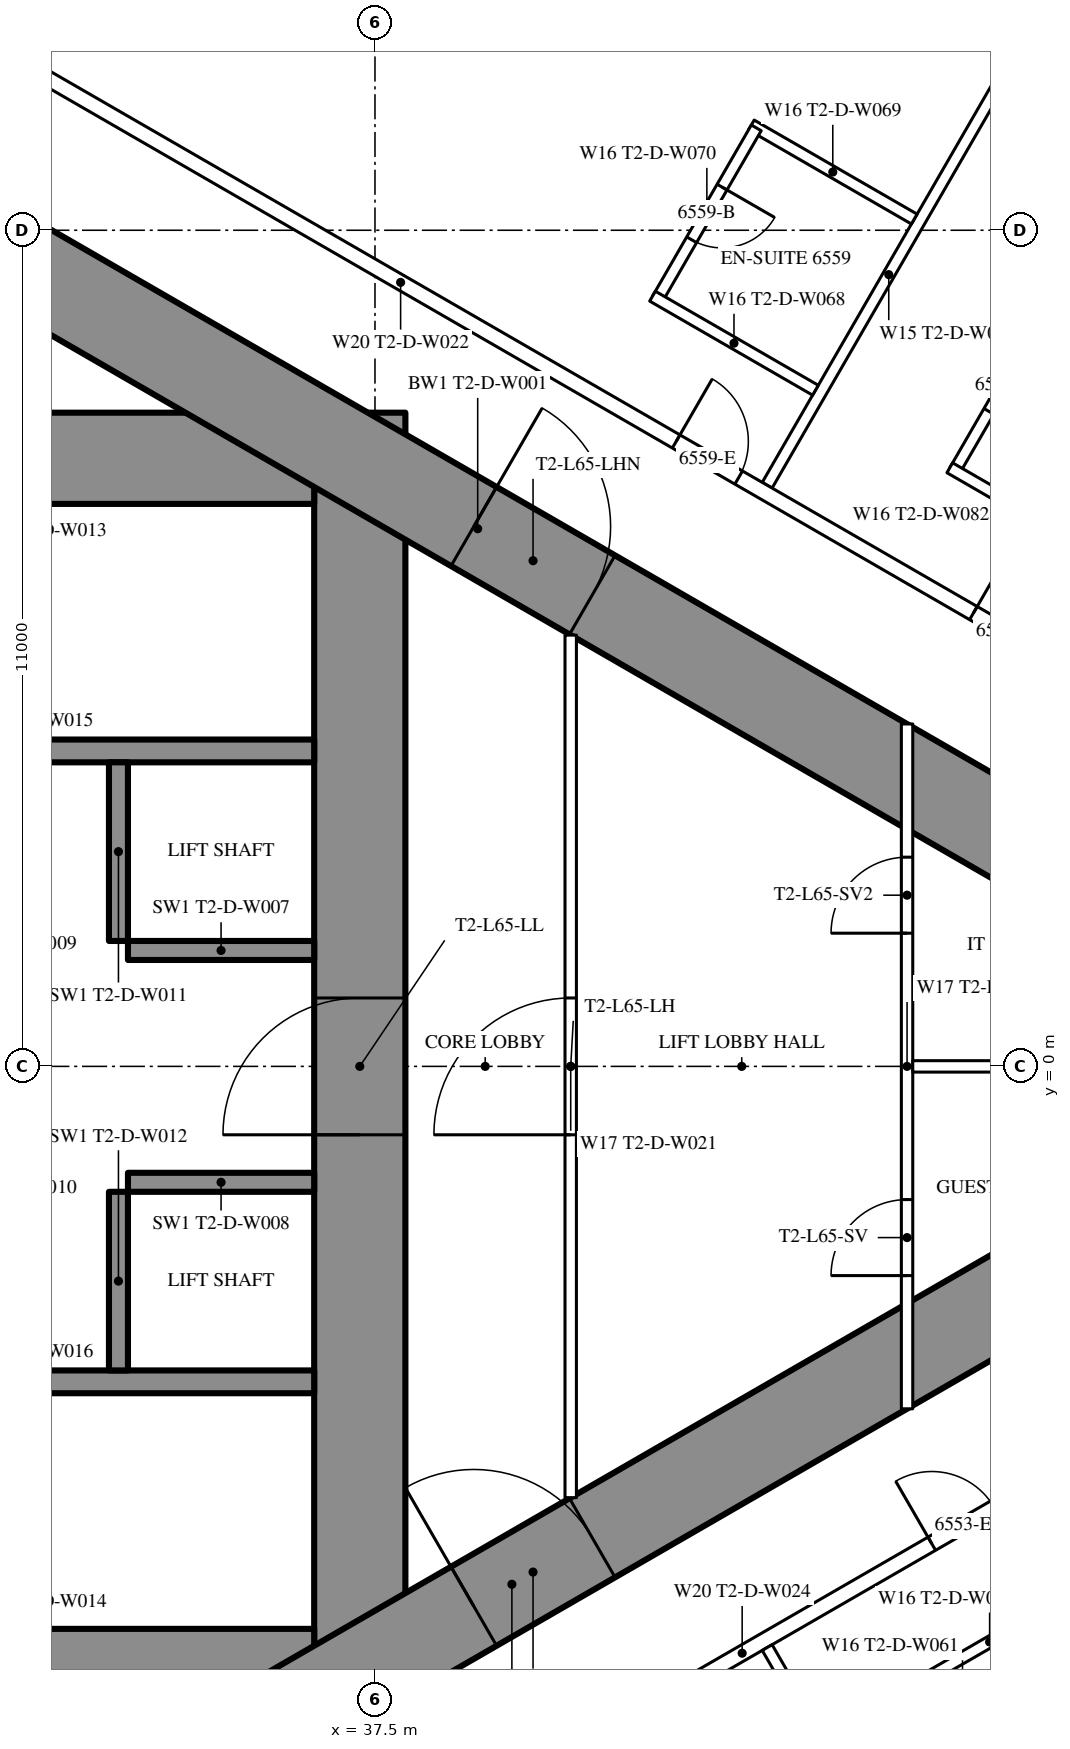
"""IFC4 building model, lengths in metres.
Left out: names, types, materials, properties, quantities, classifications, styles, units other than length and angle.
Written with IfcOpenShell. Run it as: python <this file> out.ifc"""

import sys

from ifc_helpers import new_model, si_unit, direction, frame, frame_2d, origin, origin_2d, place, context, subcontext, project, spatial, rectangle, circle, extrude, element, fill, save


model = new_model("IFC4")
c1 = context("Model", 3, precision=1e-05, world=origin(), true_north=direction((0.0, 1.0)))
c2 = subcontext(c1, "Body", "Model", "MODEL_VIEW")
j1 = project(units=[si_unit("LENGTHUNIT", "METRE"), si_unit("PLANEANGLEUNIT", "RADIAN")], contexts=[c1])
p1 = place(None, origin())
s1 = spatial("IfcSite", under=j1, at=p1, CompositionType="ELEMENT")
p2 = place(p1, origin())
s2 = spatial("IfcBuilding", under=s1, at=p2, CompositionType="ELEMENT")
p3 = place(p2, frame((0.0, 0.0, 244.1)))
s3 = spatial("IfcBuildingStorey", under=s2, at=p3, CompositionType="ELEMENT", Elevation=244.1)
p4 = place(p3, frame((46.499, 14.226, 0.0), z_axis=(0.0, 0.0, 1.0), x_axis=(1.0, 0.0, 0.0)))
e1 = element("IfcColumn", 1, at=p4, inside=s3, PredefinedType="COLUMN", context=c2, shape_type="SweptSolid", body=[
    extrude(circle(Radius=1.2, at=origin_2d()), origin(), (0.0, 0.0, 1.0), 3.6),
])
p5 = place(p3, frame((37.3, -8.6, 0.0), z_axis=(0.0, 0.0, 1.0), x_axis=(0.0, 1.0, 0.0)))
e2 = element("IfcWall", 2, at=p5, inside=s3, PredefinedType="SHEAR", context=c2, shape_type="SweptSolid", body=[
    extrude(rectangle(XDim=17.2, YDim=1.2, at=frame_2d((8.6, 0.0))), origin(), (0.0, 0.0, 1.0), 3.6),
])
p6 = place(p5, frame((7.7, 0.0, 0.0)))
e3 = element("IfcOpeningElement", 3, at=p6, cuts=e2, PredefinedType="OPENING", context=c2, shape_type="SweptSolid", body=[
    extrude(rectangle(XDim=1.8, YDim=2.2, at=frame_2d((0.9, 1.1))), frame((0.0, 0.61, 0.0), z_axis=(0.0, -1.0, 0.0), x_axis=(1.0, 0.0, 0.0)), (0.0, 0.0, 1.0), 1.22),
])
p7 = place(p3, frame((28.3, -8.0, 0.0), z_axis=(0.0, 0.0, 1.0), x_axis=(1.0, 0.0, 0.0)))
e4 = element("IfcWall", 4, at=p7, inside=s3, PredefinedType="SHEAR", context=c2, shape_type="SweptSolid", body=[
    extrude(rectangle(XDim=8.4, YDim=1.2, at=frame_2d((4.2, 0.0))), origin(), (0.0, 0.0, 1.0), 3.6),
])
p8 = place(p7, frame((0.25, 0.0, 0.0)))
e5 = element("IfcOpeningElement", 5, at=p8, cuts=e4, PredefinedType="OPENING", context=c2, shape_type="SweptSolid", body=[
    extrude(rectangle(XDim=1.0, YDim=2.2, at=frame_2d((0.5, 1.1))), frame((0.0, 0.61, 0.0), z_axis=(0.0, -1.0, 0.0), x_axis=(1.0, 0.0, 0.0)), (0.0, 0.0, 1.0), 1.22),
])
p9 = place(p3, frame((28.3, 8.0, 0.0), z_axis=(0.0, 0.0, 1.0), x_axis=(1.0, 0.0, 0.0)))
e6 = element("IfcWall", 6, at=p9, inside=s3, PredefinedType="SHEAR", context=c2, shape_type="SweptSolid", body=[
    extrude(rectangle(XDim=8.4, YDim=1.2, at=frame_2d((4.2, 0.0))), origin(), (0.0, 0.0, 1.0), 3.6),
])
p10 = place(p9, frame((0.25, 0.0, 0.0)))
e7 = element("IfcOpeningElement", 7, at=p10, cuts=e6, PredefinedType="OPENING", context=c2, shape_type="SweptSolid", body=[
    extrude(rectangle(XDim=1.0, YDim=2.2, at=frame_2d((0.5, 1.1))), frame((0.0, 0.61, 0.0), z_axis=(0.0, -1.0, 0.0), x_axis=(1.0, 0.0, 0.0)), (0.0, 0.0, 1.0), 1.22),
])
for number, where, z_axis, x_axis in (
    (8, (28.3, -4.15, 0.0), (0.0, 0.0, 1.0), (1.0, 0.0, 0.0)),
    (9, (28.3, 4.15, 0.0), (0.0, 0.0, 1.0), (1.0, 0.0, 0.0)),
):
    element("IfcWall", number, at=place(p3, frame(where, z_axis=z_axis, x_axis=x_axis)), inside=s3, PredefinedType="SHEAR", context=c2, shape_type="SweptSolid", body=[
        extrude(rectangle(XDim=8.4, YDim=0.3, at=frame_2d((4.2, 0.0))), origin(), (0.0, 0.0, 1.0), 3.6),
    ])
p11 = place(p3, frame((34.125, -4.0, 0.0), z_axis=(0.0, 0.0, 1.0), x_axis=(0.0, 1.0, 0.0)))
e10 = element("IfcWall", 10, at=p11, inside=s3, PredefinedType="SHEAR", context=c2, shape_type="SweptSolid", body=[
    extrude(rectangle(XDim=2.35, YDim=0.25, at=frame_2d((1.175, 0.0))), origin(), (0.0, 0.0, 1.0), 3.6),
])
p12 = place(p3, frame((34.25, -1.525, 0.0), z_axis=(0.0, 0.0, 1.0), x_axis=(1.0, 0.0, 0.0)))
e11 = element("IfcWall", 11, at=p12, inside=s3, PredefinedType="SHEAR", context=c2, shape_type="SweptSolid", body=[
    extrude(rectangle(XDim=2.45, YDim=0.25, at=frame_2d((1.225, 0.0))), origin(), (0.0, 0.0, 1.0), 3.6),
])
p13 = place(p3, frame((34.125, 1.65, 0.0), z_axis=(0.0, 0.0, 1.0), x_axis=(0.0, 1.0, 0.0)))
e12 = element("IfcWall", 12, at=p13, inside=s3, PredefinedType="SHEAR", context=c2, shape_type="SweptSolid", body=[
    extrude(rectangle(XDim=2.35, YDim=0.25, at=frame_2d((1.175, 0.0))), origin(), (0.0, 0.0, 1.0), 3.6),
])
p14 = place(p3, frame((34.25, 1.525, 0.0), z_axis=(0.0, 0.0, 1.0), x_axis=(1.0, 0.0, 0.0)))
e13 = element("IfcWall", 13, at=p14, inside=s3, PredefinedType="SHEAR", context=c2, shape_type="SweptSolid", body=[
    extrude(rectangle(XDim=2.45, YDim=0.25, at=frame_2d((1.225, 0.0))), origin(), (0.0, 0.0, 1.0), 3.6),
])
p15 = place(p3, frame((27.2, -13.8, 0.0), z_axis=(0.0, 0.0, 1.0), x_axis=(0.866027159892, 0.499996958321, 0.0)))
e14 = element("IfcWall", 14, at=p15, inside=s3, PredefinedType="SHEAR", context=c2, shape_type="SweptSolid", body=[
    extrude(rectangle(XDim=27.947, YDim=1.2, at=frame_2d((13.973, 0.0))), origin(), (0.0, 0.0, 1.0), 3.6),
])
p16 = place(p15, frame((4.6, 0.0, 0.0)))
e15 = element("IfcOpeningElement", 15, at=p16, cuts=e14, PredefinedType="OPENING", context=c2, shape_type="SweptSolid", body=[
    extrude(rectangle(XDim=1.0, YDim=2.2, at=frame_2d((0.5, 1.1))), frame((0.0, 0.61, 0.0), z_axis=(0.0, -1.0, 0.0), x_axis=(1.0, 0.0, 0.0)), (0.0, 0.0, 1.0), 1.22),
])
p17 = place(p15, frame((13.395, 0.0, 0.0)))
e16 = element("IfcOpeningElement", 16, at=p17, cuts=e14, PredefinedType="OPENING", context=c2, shape_type="SweptSolid", body=[
    extrude(rectangle(XDim=1.8, YDim=2.2, at=frame_2d((0.9, 1.1))), frame((0.0, 0.61, 0.0), z_axis=(0.0, -1.0, 0.0), x_axis=(1.0, 0.0, 0.0)), (0.0, 0.0, 1.0), 1.22),
])
p18 = place(p3, frame((27.2, 13.8, 0.0), z_axis=(0.0, 0.0, 1.0), x_axis=(0.866024515034, -0.500001539357, 0.0)))
e17 = element("IfcWall", 17, at=p18, inside=s3, PredefinedType="SHEAR", context=c2, shape_type="SweptSolid", body=[
    extrude(rectangle(XDim=26.907, YDim=1.2, at=frame_2d((13.454, 0.0))), origin(), (0.0, 0.0, 1.0), 3.6),
])
p19 = place(p18, frame((4.6, 0.0, 0.0)))
e18 = element("IfcOpeningElement", 18, at=p19, cuts=e17, PredefinedType="OPENING", context=c2, shape_type="SweptSolid", body=[
    extrude(rectangle(XDim=1.0, YDim=2.2, at=frame_2d((0.5, 1.1))), frame((0.0, 0.61, 0.0), z_axis=(0.0, -1.0, 0.0), x_axis=(1.0, 0.0, 0.0)), (0.0, 0.0, 1.0), 1.22),
])
p20 = place(p18, frame((13.395, 0.0, 0.0)))
e19 = element("IfcOpeningElement", 19, at=p20, cuts=e17, PredefinedType="OPENING", context=c2, shape_type="SweptSolid", body=[
    extrude(rectangle(XDim=1.8, YDim=2.2, at=frame_2d((0.9, 1.1))), frame((0.0, 0.61, 0.0), z_axis=(0.0, -1.0, 0.0), x_axis=(1.0, 0.0, 0.0)), (0.0, 0.0, 1.0), 1.22),
])
p21 = place(p3, frame((28.959, -15.44, 0.0), z_axis=(0.0, 0.0, 1.0), x_axis=(0.866025227435, 0.500000305447, 0.0)))
e20 = element("IfcWall", 20, at=p21, inside=s3, PredefinedType="PARTITIONING", context=c2, shape_type="SweptSolid", body=[
    extrude(rectangle(XDim=30.88, YDim=0.2, at=frame_2d((15.44, 0.0))), origin(), (0.0, 0.0, 1.0), 3.35),
])
p22 = place(p21, frame((1.494, 0.0, 0.0)))
e21 = element("IfcOpeningElement", 21, at=p22, cuts=e20, PredefinedType="OPENING", context=c2, shape_type="SweptSolid", body=[
    extrude(rectangle(XDim=1.8, YDim=2.04, at=frame_2d((0.9, 1.02))), frame((0.0, 0.11, 0.0), z_axis=(0.0, -1.0, 0.0), x_axis=(1.0, 0.0, 0.0)), (0.0, 0.0, 1.0), 0.22),
])
p23 = place(p21, frame((7.687, 0.0, 0.0)))
e22 = element("IfcOpeningElement", 22, at=p23, cuts=e20, PredefinedType="OPENING", context=c2, shape_type="SweptSolid", body=[
    extrude(rectangle(XDim=1.0, YDim=2.2, at=frame_2d((0.5, 1.1))), frame((0.0, 0.11, 0.0), z_axis=(0.0, -1.0, 0.0), x_axis=(1.0, 0.0, 0.0)), (0.0, 0.0, 1.0), 0.22),
])
p24 = place(p21, frame((18.321, 0.0, 0.0)))
e23 = element("IfcOpeningElement", 23, at=p24, cuts=e20, PredefinedType="OPENING", context=c2, shape_type="SweptSolid", body=[
    extrude(rectangle(XDim=0.95, YDim=2.2, at=frame_2d((0.475, 1.1))), frame((0.0, 0.11, 0.0), z_axis=(0.0, -1.0, 0.0), x_axis=(1.0, 0.0, 0.0)), (0.0, 0.0, 1.0), 0.22),
])
p25 = place(p21, frame((22.203, 0.0, 0.0)))
e24 = element("IfcOpeningElement", 24, at=p25, cuts=e20, PredefinedType="OPENING", context=c2, shape_type="SweptSolid", body=[
    extrude(rectangle(XDim=0.95, YDim=2.2, at=frame_2d((0.475, 1.1))), frame((0.0, 0.11, 0.0), z_axis=(0.0, -1.0, 0.0), x_axis=(1.0, 0.0, 0.0)), (0.0, 0.0, 1.0), 0.22),
])
p26 = place(p21, frame((26.192, 0.0, 0.0)))
e25 = element("IfcOpeningElement", 25, at=p26, cuts=e20, PredefinedType="OPENING", context=c2, shape_type="SweptSolid", body=[
    extrude(rectangle(XDim=1.8, YDim=2.2, at=frame_2d((0.9, 1.1))), frame((0.0, 0.11, 0.0), z_axis=(0.0, -1.0, 0.0), x_axis=(1.0, 0.0, 0.0)), (0.0, 0.0, 1.0), 0.22),
])
p27 = place(p3, frame((42.66, -7.646, 0.0), z_axis=(0.0, 0.0, 1.0), x_axis=(0.499996592859, -0.866027370889, 0.0)))
e26 = element("IfcWall", 26, at=p27, inside=s3, PredefinedType="PARTITIONING", context=c2, shape_type="SweptSolid", body=[
    extrude(rectangle(XDim=6.398, YDim=0.15, at=frame_2d((3.199, 0.0))), origin(), (0.0, 0.0, 1.0), 2.45),
])
p28 = place(p3, frame((32.96, 13.246, 0.0), z_axis=(0.0, 0.0, 1.0), x_axis=(0.500000236886, 0.866025267018, 0.0)))
e27 = element("IfcWall", 27, at=p28, inside=s3, PredefinedType="PARTITIONING", context=c2, shape_type="SweptSolid", body=[
    extrude(rectangle(XDim=7.583, YDim=0.15, at=frame_2d((3.791, 0.0))), origin(), (0.0, 0.0, 1.0), 3.35),
])
p29 = place(p3, frame((42.66, 7.646, 0.0), z_axis=(0.0, 0.0, 1.0), x_axis=(0.499996592859, 0.866027370889, 0.0)))
e28 = element("IfcWall", 28, at=p29, inside=s3, PredefinedType="PARTITIONING", context=c2, shape_type="SweptSolid", body=[
    extrude(rectangle(XDim=6.398, YDim=0.15, at=frame_2d((3.199, 0.0))), origin(), (0.0, 0.0, 1.0), 2.45),
])
p30 = place(p3, frame((28.959, 15.44, 0.0), z_axis=(0.0, 0.0, 1.0), x_axis=(0.866028936079, -0.499993881836, 0.0)))
e29 = element("IfcWall", 29, at=p30, inside=s3, PredefinedType="PARTITIONING", context=c2, shape_type="SweptSolid", body=[
    extrude(rectangle(XDim=20.503, YDim=0.2, at=frame_2d((10.251, 0.0))), origin(), (0.0, 0.0, 1.0), 3.35),
])
p31 = place(p30, frame((18.953, 0.0, 0.0)))
e30 = element("IfcOpeningElement", 30, at=p31, cuts=e29, PredefinedType="OPENING", context=c2, shape_type="SweptSolid", body=[
    extrude(rectangle(XDim=0.95, YDim=2.2, at=frame_2d((0.475, 1.1))), frame((0.0, 0.11, 0.0), z_axis=(0.0, -1.0, 0.0), x_axis=(1.0, 0.0, 0.0)), (0.0, 0.0, 1.0), 0.22),
])
p32 = place(p30, frame((14.437, 0.0, 0.0)))
e31 = element("IfcOpeningElement", 31, at=p32, cuts=e29, PredefinedType="OPENING", context=c2, shape_type="SweptSolid", body=[
    extrude(rectangle(XDim=0.95, YDim=2.2, at=frame_2d((0.475, 1.1))), frame((0.0, 0.11, 0.0), z_axis=(0.0, -1.0, 0.0), x_axis=(1.0, 0.0, 0.0)), (0.0, 0.0, 1.0), 0.22),
])
p33 = place(p30, frame((2.244, 0.0, 0.0)))
e32 = element("IfcOpeningElement", 32, at=p33, cuts=e29, PredefinedType="OPENING", context=c2, shape_type="SweptSolid", body=[
    extrude(rectangle(XDim=1.8, YDim=2.04, at=frame_2d((0.9, 1.02))), frame((0.0, 0.11, 0.0), z_axis=(0.0, -1.0, 0.0), x_axis=(1.0, 0.0, 0.0)), (0.0, 0.0, 1.0), 0.22),
])
p34 = place(p3, frame((44.514, -8.191, 0.0), z_axis=(0.0, 0.0, 1.0), x_axis=(0.866031185235, 0.4999899861, 0.0)))
e33 = element("IfcWall", 33, at=p34, inside=s3, PredefinedType="PARTITIONING", context=c2, shape_type="SweptSolid", body=[
    extrude(rectangle(XDim=2.475, YDim=0.15, at=frame_2d((1.238, 0.0))), origin(), (0.0, 0.0, 1.0), 3.35),
])
p35 = place(p3, frame((45.127, 7.838, 0.0), z_axis=(0.0, 0.0, 1.0), x_axis=(0.500006934395, 0.866021400173, 0.0)))
e34 = element("IfcWall", 34, at=p35, inside=s3, PredefinedType="PARTITIONING", context=c2, shape_type="SweptSolid", body=[
    extrude(rectangle(XDim=2.6, YDim=0.15, at=frame_2d((1.3, 0.0))), origin(), (0.0, 0.0, 1.0), 3.35),
])
p36 = place(p35, frame((0.9, 0.0, 0.0)))
e35 = element("IfcOpeningElement", 35, at=p36, cuts=e34, PredefinedType="OPENING", context=c2, shape_type="SweptSolid", body=[
    extrude(rectangle(XDim=0.8, YDim=2.2, at=frame_2d((0.4, 1.1))), frame((0.0, 0.085, 0.0), z_axis=(0.0, -1.0, 0.0), x_axis=(1.0, 0.0, 0.0)), (0.0, 0.0, 1.0), 0.17),
])
p37 = place(p3, frame((45.062, 7.875, 0.0), z_axis=(0.0, 0.0, 1.0), x_axis=(0.866031185235, -0.4999899861, 0.0)))
e36 = element("IfcWall", 36, at=p37, inside=s3, PredefinedType="PARTITIONING", context=c2, shape_type="SweptSolid", body=[
    extrude(rectangle(XDim=2.475, YDim=0.15, at=frame_2d((1.238, 0.0))), origin(), (0.0, 0.0, 1.0), 2.5),
])
p38 = place(p3, frame((42.451, 12.385, 0.0), z_axis=(0.0, 0.0, 1.0), x_axis=(0.866031185235, -0.4999899861, 0.0)))
e37 = element("IfcWall", 37, at=p38, inside=s3, PredefinedType="PARTITIONING", context=c2, shape_type="SweptSolid", body=[
    extrude(rectangle(XDim=2.475, YDim=0.15, at=frame_2d((1.238, 0.0))), origin(), (0.0, 0.0, 1.0), 3.35),
])
p39 = place(p3, frame((41.216, 10.095, 0.0), z_axis=(0.0, 0.0, 1.0), x_axis=(0.499936506574, 0.866062058628, 0.0)))
e38 = element("IfcWall", 38, at=p39, inside=s3, PredefinedType="PARTITIONING", context=c2, shape_type="SweptSolid", body=[
    extrude(rectangle(XDim=2.6, YDim=0.15, at=frame_2d((1.3, 0.0))), origin(), (0.0, 0.0, 1.0), 3.35),
])
p40 = place(p39, frame((0.9, 0.0, 0.0)))
e39 = element("IfcOpeningElement", 39, at=p40, cuts=e38, PredefinedType="OPENING", context=c2, shape_type="SweptSolid", body=[
    extrude(rectangle(XDim=0.8, YDim=2.2, at=frame_2d((0.4, 1.1))), frame((0.0, 0.085, 0.0), z_axis=(0.0, -1.0, 0.0), x_axis=(1.0, 0.0, 0.0)), (0.0, 0.0, 1.0), 0.17),
])
p41 = place(p3, frame((41.151, 10.133, 0.0), z_axis=(0.0, 0.0, 1.0), x_axis=(0.866006523861, -0.500032699561, 0.0)))
e40 = element("IfcWall", 40, at=p41, inside=s3, PredefinedType="PARTITIONING", context=c2, shape_type="SweptSolid", body=[
    extrude(rectangle(XDim=2.475, YDim=0.15, at=frame_2d((1.237, 0.0))), origin(), (0.0, 0.0, 1.0), 2.5),
])
p42 = place(p3, frame((40.075, -5.674, 0.0), z_axis=(0.0, 0.0, 1.0), x_axis=(0.0, 1.0, 0.0)))
e41 = element("IfcWall", 41, at=p42, inside=s3, PredefinedType="PARTITIONING", context=c2, shape_type="SweptSolid", body=[
    extrude(rectangle(XDim=11.348, YDim=0.15, at=frame_2d((5.674, 0.0))), origin(), (0.0, 0.0, 1.0), 3.35),
])
p43 = place(p42, frame((4.774, 0.0, 0.0)))
e42 = element("IfcOpeningElement", 42, at=p43, cuts=e41, PredefinedType="OPENING", context=c2, shape_type="SweptSolid", body=[
    extrude(rectangle(XDim=1.8, YDim=2.2, at=frame_2d((0.9, 1.1))), frame((0.0, 0.085, 0.0), z_axis=(0.0, -1.0, 0.0), x_axis=(1.0, 0.0, 0.0)), (0.0, 0.0, 1.0), 0.17),
])
p44 = place(p3, frame((44.5, -4.505, 0.0), z_axis=(0.0, 0.0, 1.0), x_axis=(0.0, 1.0, 0.0)))
e43 = element("IfcWall", 43, at=p44, inside=s3, PredefinedType="PARTITIONING", context=c2, shape_type="SweptSolid", body=[
    extrude(rectangle(XDim=9.009, YDim=0.15, at=frame_2d((4.505, 0.0))), origin(), (0.0, 0.0, 1.0), 3.35),
])
p45 = place(p44, frame((1.752, 0.0, 0.0)))
e44 = element("IfcOpeningElement", 44, at=p45, cuts=e43, PredefinedType="OPENING", context=c2, shape_type="SweptSolid", body=[
    extrude(rectangle(XDim=1.0, YDim=2.2, at=frame_2d((0.5, 1.1))), frame((0.0, 0.085, 0.0), z_axis=(0.0, -1.0, 0.0), x_axis=(1.0, 0.0, 0.0)), (0.0, 0.0, 1.0), 0.17),
])
p46 = place(p44, frame((6.257, 0.0, 0.0)))
e45 = element("IfcOpeningElement", 45, at=p46, cuts=e43, PredefinedType="OPENING", context=c2, shape_type="SweptSolid", body=[
    extrude(rectangle(XDim=1.0, YDim=2.2, at=frame_2d((0.5, 1.1))), frame((0.0, 0.085, 0.0), z_axis=(0.0, -1.0, 0.0), x_axis=(1.0, 0.0, 0.0)), (0.0, 0.0, 1.0), 0.17),
])
p47 = place(p3, frame((44.575, 0.0, 0.0), z_axis=(0.0, 0.0, 1.0), x_axis=(1.0, 0.0, 0.0)))
e46 = element("IfcWall", 46, at=p47, inside=s3, PredefinedType="PARTITIONING", context=c2, shape_type="SweptSolid", body=[
    extrude(rectangle(XDim=7.727, YDim=0.15, at=frame_2d((3.864, 0.0))), origin(), (0.0, 0.0, 1.0), 2.45),
])
p48 = place(p24, origin())
e47 = element("IfcDoor", 47, at=p48, inside=s3, OperationType="SINGLE_SWING_LEFT", PredefinedType="DOOR", context=c2, shape_type="SweptSolid", body=[
    extrude(rectangle(XDim=0.95, YDim=2.2, at=frame_2d((0.475, 1.1))), frame((0.0, 0.025, 0.0), z_axis=(0.0, -1.0, 0.0), x_axis=(1.0, 0.0, 0.0)), (0.0, 0.0, 1.0), 0.05),
])
fill(e23, e47)
p49 = place(p36, origin())
e48 = element("IfcDoor", 48, at=p49, inside=s3, OperationType="SINGLE_SWING_RIGHT", PredefinedType="DOOR", context=c2, shape_type="SweptSolid", body=[
    extrude(rectangle(XDim=0.8, YDim=2.2, at=frame_2d((0.4, 1.1))), frame((0.0, 0.025, 0.0), z_axis=(0.0, -1.0, 0.0), x_axis=(1.0, 0.0, 0.0)), (0.0, 0.0, 1.0), 0.05),
])
fill(e35, e48)
p50 = place(p31, origin())
e49 = element("IfcDoor", 49, at=p50, inside=s3, OperationType="SINGLE_SWING_LEFT", PredefinedType="DOOR", context=c2, shape_type="SweptSolid", body=[
    extrude(rectangle(XDim=0.95, YDim=2.2, at=frame_2d((0.475, 1.1))), frame((0.0, 0.025, 0.0), z_axis=(0.0, -1.0, 0.0), x_axis=(1.0, 0.0, 0.0)), (0.0, 0.0, 1.0), 0.05),
])
fill(e30, e49)
p51 = place(p40, origin())
e50 = element("IfcDoor", 50, at=p51, inside=s3, OperationType="SINGLE_SWING_RIGHT", PredefinedType="DOOR", context=c2, shape_type="SweptSolid", body=[
    extrude(rectangle(XDim=0.8, YDim=2.2, at=frame_2d((0.4, 1.1))), frame((0.0, 0.025, 0.0), z_axis=(0.0, -1.0, 0.0), x_axis=(1.0, 0.0, 0.0)), (0.0, 0.0, 1.0), 0.05),
])
fill(e39, e50)
p52 = place(p32, origin())
e51 = element("IfcDoor", 51, at=p52, inside=s3, OperationType="SINGLE_SWING_LEFT", PredefinedType="DOOR", context=c2, shape_type="SweptSolid", body=[
    extrude(rectangle(XDim=0.95, YDim=2.2, at=frame_2d((0.475, 1.1))), frame((0.0, 0.025, 0.0), z_axis=(0.0, -1.0, 0.0), x_axis=(1.0, 0.0, 0.0)), (0.0, 0.0, 1.0), 0.05),
])
fill(e31, e51)
p53 = place(p43, origin())
e52 = element("IfcDoor", 52, at=p53, inside=s3, OperationType="DOUBLE_DOOR_SINGLE_SWING", PredefinedType="DOOR", context=c2, shape_type="SweptSolid", body=[
    extrude(rectangle(XDim=1.8, YDim=2.2, at=frame_2d((0.9, 1.1))), frame((0.0, 0.025, 0.0), z_axis=(0.0, -1.0, 0.0), x_axis=(1.0, 0.0, 0.0)), (0.0, 0.0, 1.0), 0.05),
])
fill(e42, e52)
p54 = place(p45, origin())
e53 = element("IfcDoor", 53, at=p54, inside=s3, OperationType="SINGLE_SWING_LEFT", PredefinedType="DOOR", context=c2, shape_type="SweptSolid", body=[
    extrude(rectangle(XDim=1.0, YDim=2.2, at=frame_2d((0.5, 1.1))), frame((0.0, 0.025, 0.0), z_axis=(0.0, -1.0, 0.0), x_axis=(1.0, 0.0, 0.0)), (0.0, 0.0, 1.0), 0.05),
])
fill(e44, e53)
p55 = place(p46, origin())
e54 = element("IfcDoor", 54, at=p55, inside=s3, OperationType="SINGLE_SWING_LEFT", PredefinedType="DOOR", context=c2, shape_type="SweptSolid", body=[
    extrude(rectangle(XDim=1.0, YDim=2.2, at=frame_2d((0.5, 1.1))), frame((0.0, 0.025, 0.0), z_axis=(0.0, -1.0, 0.0), x_axis=(1.0, 0.0, 0.0)), (0.0, 0.0, 1.0), 0.05),
])
fill(e45, e54)
p56 = place(p17, origin())
e55 = element("IfcDoor", 55, at=p56, inside=s3, OperationType="DOUBLE_DOOR_SINGLE_SWING", PredefinedType="DOOR", context=c2, shape_type="SweptSolid", body=[
    extrude(rectangle(XDim=1.8, YDim=2.2, at=frame_2d((0.9, 1.1))), frame((0.0, 0.025, 0.0), z_axis=(0.0, -1.0, 0.0), x_axis=(1.0, 0.0, 0.0)), (0.0, 0.0, 1.0), 0.05),
])
fill(e16, e55)
p57 = place(p20, origin())
e56 = element("IfcDoor", 56, at=p57, inside=s3, OperationType="DOUBLE_DOOR_SINGLE_SWING", PredefinedType="DOOR", context=c2, shape_type="SweptSolid", body=[
    extrude(rectangle(XDim=1.8, YDim=2.2, at=frame_2d((0.9, 1.1))), frame((0.0, 0.025, 0.0), z_axis=(0.0, -1.0, 0.0), x_axis=(1.0, 0.0, 0.0)), (0.0, 0.0, 1.0), 0.05),
])
fill(e19, e56)
p58 = place(p6, origin())
e57 = element("IfcDoor", 57, at=p58, inside=s3, OperationType="DOUBLE_DOOR_SINGLE_SWING", PredefinedType="DOOR", context=c2, shape_type="SweptSolid", body=[
    extrude(rectangle(XDim=1.8, YDim=2.2, at=frame_2d((0.9, 1.1))), frame((0.0, 0.025, 0.0), z_axis=(0.0, -1.0, 0.0), x_axis=(1.0, 0.0, 0.0)), (0.0, 0.0, 1.0), 0.05),
])
fill(e3, e57)
save(model, sys.argv[1])
